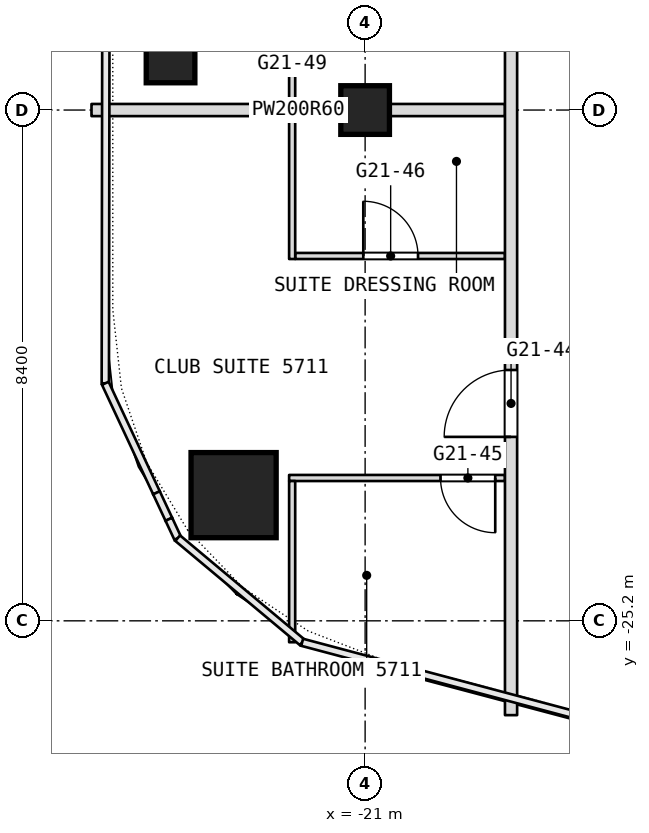
"""IFC4 building model, lengths in metres.
Left out: names, types, materials, properties, quantities, classifications, styles, units other than length and angle.
Written with IfcOpenShell. Run it as: python <this file> out.ifc"""

import sys

from ifc_helpers import new_model, si_unit, direction, frame, frame_2d, origin, origin_2d, place, context, subcontext, project, spatial, rectangle, extrude, element, fill, save


model = new_model("IFC4")
c1 = context("Model", 3, precision=1e-05, world=origin(), true_north=direction((0.0, 1.0)))
c2 = subcontext(c1, "Body", "Model", "MODEL_VIEW")
j1 = project(units=[si_unit("LENGTHUNIT", "METRE"), si_unit("PLANEANGLEUNIT", "RADIAN")], contexts=[c1])
p1 = place(None, origin())
s1 = spatial("IfcSite", under=j1, at=p1, CompositionType="ELEMENT")
p2 = place(p1, origin())
s2 = spatial("IfcBuilding", under=s1, at=p2, CompositionType="ELEMENT")
p3 = place(p2, frame((0.0, 0.0, 241.7)))
s3 = spatial("IfcBuildingStorey", under=s2, at=p3, CompositionType="ELEMENT", Elevation=241.7)
p4 = place(p3, frame((-23.163, -23.133, 0.0), z_axis=(0.0, 0.0, 1.0), x_axis=(1.0, 0.0, 0.0)))
e1 = element("IfcColumn", 1, at=p4, inside=s3, PredefinedType="COLUMN", context=c2, shape_type="SweptSolid", body=[
    extrude(rectangle(XDim=1.4, YDim=1.4, at=origin_2d()), origin(), (0.0, 0.0, 1.0), 3.6),
])
for number, where, z_axis, x_axis in (
    (2, (-21.0, -16.8, 0.0), (0.0, 0.0, 1.0), (1.0, 0.0, 0.0)),
    (3, (-24.2, -15.952, 0.0), (0.0, 0.0, 1.0), (1.0, 0.0, 0.0)),
):
    element("IfcColumn", number, at=place(p3, frame(where, z_axis=z_axis, x_axis=x_axis)), inside=s3, PredefinedType="COLUMN", context=c2, shape_type="SweptSolid", body=[
        extrude(rectangle(XDim=0.8, YDim=0.8, at=origin_2d()), origin(), (0.0, 0.0, 1.0), 3.6),
    ])
p5 = place(p3, frame((-22.25, -22.851, 0.0), z_axis=(0.0, 0.0, 1.0), x_axis=(1.0, 0.0, 0.0)))
e4 = element("IfcWall", 4, at=p5, inside=s3, PredefinedType="PARTITIONING", context=c2, shape_type="SweptSolid", body=[
    extrude(rectangle(XDim=3.55, YDim=0.1, at=frame_2d((1.775, 0.0))), origin(), (0.0, 0.0, 1.0), 3.34),
])
p6 = place(p5, frame((2.49, 0.0, 0.0)))
e5 = element("IfcOpeningElement", 5, at=p6, cuts=e4, PredefinedType="OPENING", context=c2, shape_type="SweptSolid", body=[
    extrude(rectangle(XDim=0.9, YDim=2.1, at=frame_2d((0.45, 1.05))), frame((0.0, 0.05, 0.0), z_axis=(0.0, -1.0, 0.0), x_axis=(1.0, 0.0, 0.0)), (0.0, 0.0, 1.0), 0.1),
])
p7 = place(p3, frame((-22.15, -19.2, 0.0), z_axis=(0.0, 0.0, 1.0), x_axis=(1.0, 0.0, 0.0)))
e6 = element("IfcWall", 6, at=p7, inside=s3, PredefinedType="PARTITIONING", context=c2, shape_type="SweptSolid", body=[
    extrude(rectangle(XDim=3.45, YDim=0.1, at=frame_2d((1.725, 0.0))), origin(), (0.0, 0.0, 1.0), 3.34),
])
p8 = place(p7, frame((1.12, 0.0, 0.0)))
e7 = element("IfcOpeningElement", 7, at=p8, cuts=e6, PredefinedType="OPENING", context=c2, shape_type="SweptSolid", body=[
    extrude(rectangle(XDim=0.9, YDim=2.1, at=frame_2d((0.45, 1.05))), frame((0.0, 0.05, 0.0), z_axis=(0.0, -1.0, 0.0), x_axis=(1.0, 0.0, 0.0)), (0.0, 0.0, 1.0), 0.1),
])
p9 = place(p3, frame((-25.5, -16.8, 0.0), z_axis=(0.0, 0.0, 1.0), x_axis=(1.0, 0.0, 0.0)))
e8 = element("IfcWall", 8, at=p9, inside=s3, PredefinedType="PARTITIONING", context=c2, shape_type="SweptSolid", body=[
    extrude(rectangle(XDim=6.8, YDim=0.2, at=frame_2d((3.4, 0.0))), origin(), (0.0, 0.0, 1.0), 2.94),
])
p10 = place(p3, frame((-18.6, -26.751, 0.0), z_axis=(0.0, 0.0, 1.0), x_axis=(0.0, 1.0, 0.0)))
e9 = element("IfcWall", 9, at=p10, inside=s3, PredefinedType="PARTITIONING", context=c2, shape_type="SweptSolid", body=[
    extrude(rectangle(XDim=49.091, YDim=0.2, at=frame_2d((24.545, 0.0))), origin(), (0.0, 0.0, 1.0), 3.34),
])
p11 = place(p10, frame((4.576, 0.0, 0.0)))
e10 = element("IfcOpeningElement", 10, at=p11, cuts=e9, PredefinedType="OPENING", context=c2, shape_type="SweptSolid", body=[
    extrude(rectangle(XDim=1.1, YDim=2.1, at=frame_2d((0.55, 1.05))), frame((0.0, 0.1, 0.0), z_axis=(0.0, -1.0, 0.0), x_axis=(1.0, 0.0, 0.0)), (0.0, 0.0, 1.0), 0.2),
])
p12 = place(p10, frame((13.551, 0.0, 0.0)))
e11 = element("IfcOpeningElement", 11, at=p12, cuts=e9, PredefinedType="OPENING", context=c2, shape_type="SweptSolid", body=[
    extrude(rectangle(XDim=1.1, YDim=2.1, at=frame_2d((0.55, 1.05))), frame((0.0, 0.1, 0.0), z_axis=(0.0, -1.0, 0.0), x_axis=(1.0, 0.0, 0.0)), (0.0, 0.0, 1.0), 0.2),
])
p13 = place(p10, frame((22.051, 0.0, 0.0)))
e12 = element("IfcOpeningElement", 12, at=p13, cuts=e9, PredefinedType="OPENING", context=c2, shape_type="SweptSolid", body=[
    extrude(rectangle(XDim=1.1, YDim=2.1, at=frame_2d((0.55, 1.05))), frame((0.0, 0.1, 0.0), z_axis=(0.0, -1.0, 0.0), x_axis=(1.0, 0.0, 0.0)), (0.0, 0.0, 1.0), 0.2),
])
p14 = place(p10, frame((30.351, 0.0, 0.0)))
e13 = element("IfcOpeningElement", 13, at=p14, cuts=e9, PredefinedType="OPENING", context=c2, shape_type="SweptSolid", body=[
    extrude(rectangle(XDim=1.1, YDim=2.1, at=frame_2d((0.55, 1.05))), frame((0.0, 0.1, 0.0), z_axis=(0.0, -1.0, 0.0), x_axis=(1.0, 0.0, 0.0)), (0.0, 0.0, 1.0), 0.2),
])
p15 = place(p10, frame((38.851, 0.0, 0.0)))
e14 = element("IfcOpeningElement", 14, at=p15, cuts=e9, PredefinedType="OPENING", context=c2, shape_type="SweptSolid", body=[
    extrude(rectangle(XDim=1.1, YDim=2.1, at=frame_2d((0.55, 1.05))), frame((0.0, 0.1, 0.0), z_axis=(0.0, -1.0, 0.0), x_axis=(1.0, 0.0, 0.0)), (0.0, 0.0, 1.0), 0.2),
])
p16 = place(p10, frame((44.051, 0.0, 0.0)))
e15 = element("IfcOpeningElement", 15, at=p16, cuts=e9, PredefinedType="OPENING", context=c2, shape_type="SweptSolid", body=[
    extrude(rectangle(XDim=1.0, YDim=2.1, at=frame_2d((0.5, 1.05))), frame((0.0, 0.1, 0.0), z_axis=(0.0, -1.0, 0.0), x_axis=(1.0, 0.0, 0.0)), (0.0, 0.0, 1.0), 0.2),
])
p17 = place(p3, frame((-22.2, -25.552, 0.0), z_axis=(0.0, 0.0, 1.0), x_axis=(0.0, 1.0, 0.0)))
e16 = element("IfcWall", 16, at=p17, inside=s3, PredefinedType="PARTITIONING", context=c2, shape_type="SweptSolid", body=[
    extrude(rectangle(XDim=2.651, YDim=0.1, at=frame_2d((1.326, 0.0))), origin(), (0.0, 0.0, 1.0), 3.34),
])
p18 = place(p3, frame((-22.2, -19.25, 0.0), z_axis=(0.0, 0.0, 1.0), x_axis=(0.0, 1.0, 0.0)))
e17 = element("IfcWall", 17, at=p18, inside=s3, PredefinedType="PARTITIONING", context=c2, shape_type="SweptSolid", body=[
    extrude(rectangle(XDim=4.8, YDim=0.1, at=frame_2d((2.4, 0.0))), origin(), (0.0, 0.0, 1.0), 3.34),
])
p19 = place(p18, frame((3.75, 0.0, 0.0)))
e18 = element("IfcOpeningElement", 18, at=p19, cuts=e17, PredefinedType="OPENING", context=c2, shape_type="SweptSolid", body=[
    extrude(rectangle(XDim=0.9, YDim=2.1, at=frame_2d((0.45, 1.05))), frame((0.0, 0.05, 0.0), z_axis=(0.0, -1.0, 0.0), x_axis=(1.0, 0.0, 0.0)), (0.0, 0.0, 1.0), 0.1),
])
p20 = place(p6, origin())
e19 = element("IfcDoor", 19, at=p20, inside=s3, OperationType="SINGLE_SWING_LEFT", PredefinedType="DOOR", context=c2, shape_type="SweptSolid", body=[
    extrude(rectangle(XDim=0.9, YDim=2.1, at=frame_2d((0.45, 1.05))), frame((0.0, 0.025, 0.0), z_axis=(0.0, -1.0, 0.0), x_axis=(1.0, 0.0, 0.0)), (0.0, 0.0, 1.0), 0.05),
])
fill(e5, e19)
p21 = place(p8, origin())
e20 = element("IfcDoor", 20, at=p21, inside=s3, OperationType="SINGLE_SWING_LEFT", PredefinedType="DOOR", context=c2, shape_type="SweptSolid", body=[
    extrude(rectangle(XDim=0.9, YDim=2.1, at=frame_2d((0.45, 1.05))), frame((0.0, 0.025, 0.0), z_axis=(0.0, -1.0, 0.0), x_axis=(1.0, 0.0, 0.0)), (0.0, 0.0, 1.0), 0.05),
])
fill(e7, e20)
p22 = place(p11, origin())
e21 = element("IfcDoor", 21, at=p22, inside=s3, OperationType="SINGLE_SWING_LEFT", PredefinedType="DOOR", context=c2, shape_type="SweptSolid", body=[
    extrude(rectangle(XDim=1.1, YDim=2.1, at=frame_2d((0.55, 1.05))), frame((0.0, 0.025, 0.0), z_axis=(0.0, -1.0, 0.0), x_axis=(1.0, 0.0, 0.0)), (0.0, 0.0, 1.0), 0.05),
])
fill(e10, e21)
save(model, sys.argv[1])
